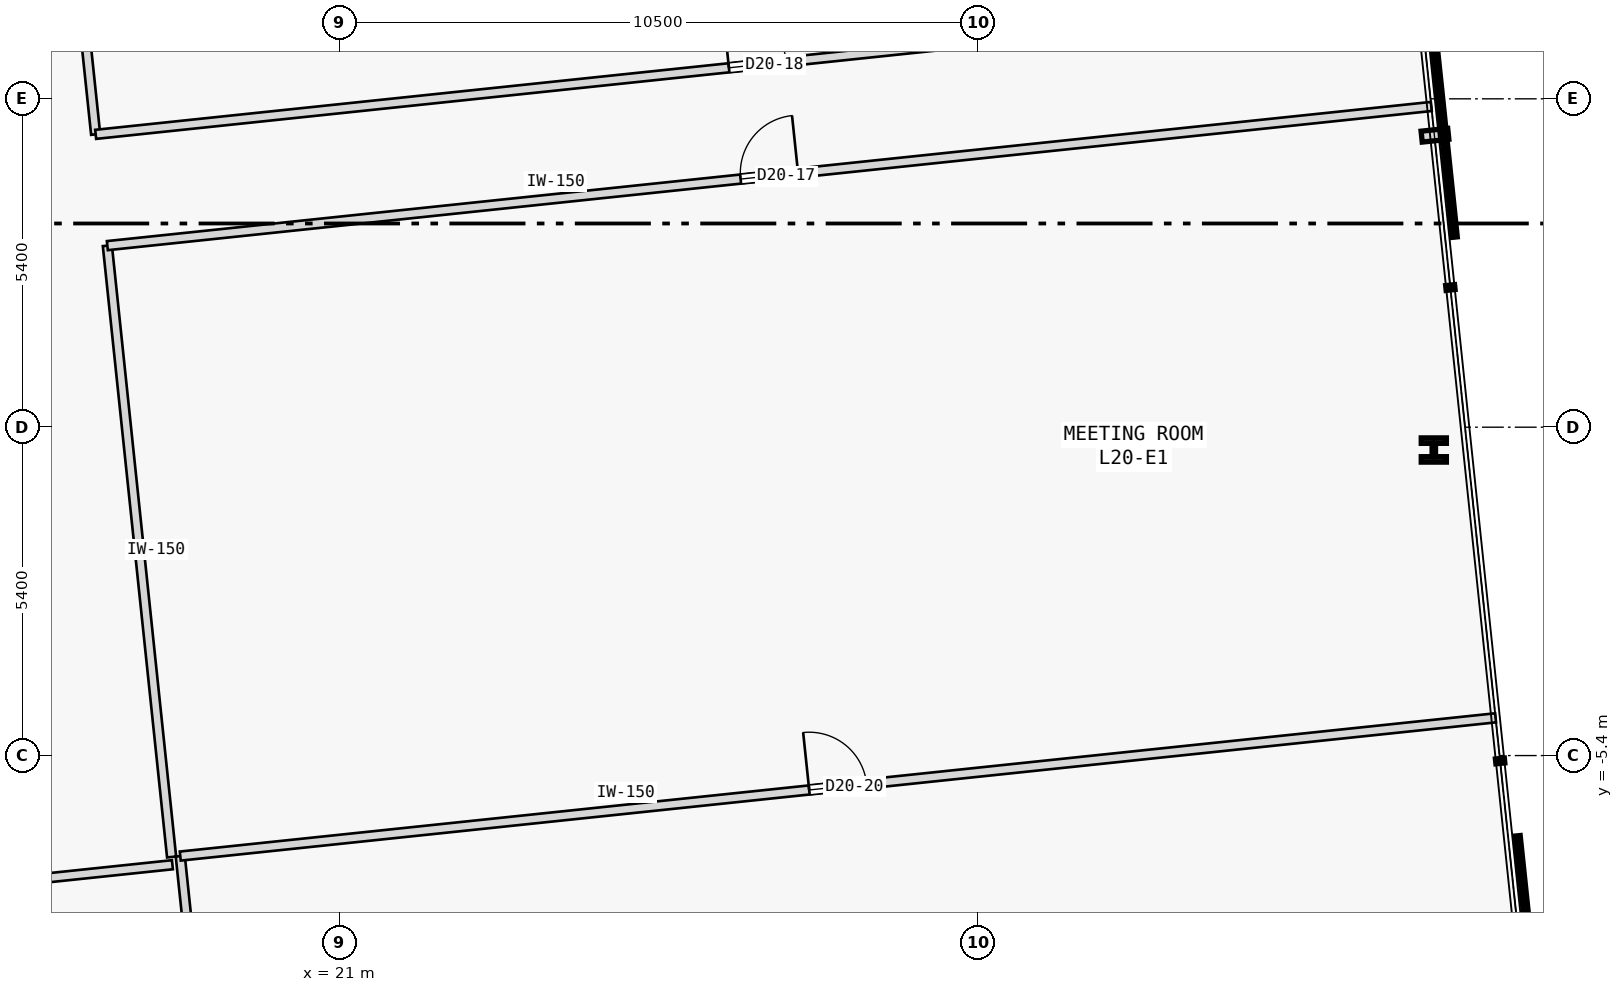
"""IFC4 building model, lengths in metres.
Left out: names, types, materials, properties, quantities, classifications, styles, units other than length and angle.
Written with IfcOpenShell. Run it as: python <this file> out.ifc"""

import sys

from ifc_helpers import new_model, si_unit, direction, frame, frame_2d, origin, origin_2d, place, context, subcontext, project, spatial, rectangle, i_section, extrude, element, fill, save


model = new_model("IFC4")
c1 = context("Model", 3, precision=1e-05, world=origin(), true_north=direction((0.0, 1.0)))
c2 = subcontext(c1, "Body", "Model", "MODEL_VIEW")
j1 = project(units=[si_unit("LENGTHUNIT", "METRE"), si_unit("PLANEANGLEUNIT", "RADIAN")], contexts=[c1])
p1 = place(None, origin())
s1 = spatial("IfcSite", under=j1, at=p1, CompositionType="ELEMENT")
p2 = place(p1, origin())
s2 = spatial("IfcBuilding", under=s1, at=p2, CompositionType="ELEMENT")
p3 = place(p2, frame((0.0, 0.0, 83.2)))
s3 = spatial("IfcBuildingStorey", under=s2, at=p3, CompositionType="ELEMENT", Elevation=83.2)
p4 = place(p3, frame((38.988, -0.375, 0.0), z_axis=(0.0, 0.0, 1.0), x_axis=(1.0, 0.0, 0.0)))
e1 = element("IfcColumn", 1, at=p4, inside=s3, PredefinedType="COLUMN", context=c2, shape_type="SweptSolid", body=[
    extrude(i_section(OverallWidth=0.413, OverallDepth=0.398, WebThickness=0.056, FlangeThickness=0.089, FilletRadius=0.015, at=origin_2d()), origin(), (0.0, 0.0, 1.0), 4.2),
])
p5 = place(p3, frame((4.881, -8.6, 0.0), z_axis=(0.0, 0.0, 1.0), x_axis=(0.994523954947, 0.104508865829, 0.0)))
e2 = element("IfcWall", 2, at=p5, inside=s3, PredefinedType="PARTITIONING", context=c2, shape_type="SweptSolid", body=[
    extrude(rectangle(XDim=13.437, YDim=0.15, at=frame_2d((6.719, 0.0))), origin(), (0.0, 0.0, 1.0), 3.975),
])
p6 = place(p5, frame((8.259, 0.0, 0.0)))
e3 = element("IfcOpeningElement", 3, at=p6, cuts=e2, PredefinedType="OPENING", context=c2, shape_type="SweptSolid", body=[
    extrude(rectangle(XDim=0.95, YDim=2.15, at=frame_2d((0.475, 1.075))), frame((0.0, 0.085, 0.0), z_axis=(0.0, -1.0, 0.0), x_axis=(1.0, 0.0, 0.0)), (0.0, 0.0, 1.0), 0.17),
])
p7 = place(p3, frame((18.231, -7.068, 0.0), z_axis=(0.0, 0.0, 1.0), x_axis=(-0.104523867261, 0.994522378417, 0.0)))
e4 = element("IfcWall", 4, at=p7, inside=s3, PredefinedType="PARTITIONING", context=c2, shape_type="SweptSolid", body=[
    extrude(rectangle(XDim=10.109, YDim=0.15, at=frame_2d((5.055, 0.0))), origin(), (0.0, 0.0, 1.0), 3.975),
])
p8 = place(p3, frame((17.175, 2.986, 0.0), z_axis=(0.0, 0.0, 1.0), x_axis=(0.994522365919, 0.104523986183, 0.0)))
e5 = element("IfcWall", 5, at=p8, inside=s3, PredefinedType="PARTITIONING", context=c2, shape_type="SweptSolid", body=[
    extrude(rectangle(XDim=21.893, YDim=0.15, at=frame_2d((10.946, 0.0))), origin(), (0.0, 0.0, 1.0), 3.975),
])
p9 = place(p8, frame((10.471, 0.0, 0.0)))
e6 = element("IfcOpeningElement", 6, at=p9, cuts=e5, PredefinedType="OPENING", context=c2, shape_type="SweptSolid", body=[
    extrude(rectangle(XDim=0.95, YDim=2.15, at=frame_2d((0.475, 1.075))), frame((0.0, 0.085, 0.0), z_axis=(0.0, -1.0, 0.0), x_axis=(1.0, 0.0, 0.0)), (0.0, 0.0, 1.0), 0.17),
])
p10 = place(p3, frame((16.982, 4.816, 0.0), z_axis=(0.0, 0.0, 1.0), x_axis=(-0.104528094162, 0.994521934163, 0.0)))
e7 = element("IfcWall", 7, at=p10, inside=s3, PredefinedType="PARTITIONING", context=c2, shape_type="SweptSolid", body=[
    extrude(rectangle(XDim=5.921, YDim=0.15, at=frame_2d((2.96, 0.0))), origin(), (0.0, 0.0, 1.0), 3.975),
])
p11 = place(p3, frame((16.982, 4.816, 0.0), z_axis=(0.0, 0.0, 1.0), x_axis=(0.994522487751, 0.10452282697, 0.0)))
e8 = element("IfcWall", 8, at=p11, inside=s3, PredefinedType="PARTITIONING", context=c2, shape_type="SweptSolid", body=[
    extrude(rectangle(XDim=21.893, YDim=0.15, at=frame_2d((10.947, 0.0))), origin(), (0.0, 0.0, 1.0), 3.525),
])
p12 = place(p11, frame((10.471, 0.0, 0.0)))
e9 = element("IfcOpeningElement", 9, at=p12, cuts=e8, PredefinedType="OPENING", context=c2, shape_type="SweptSolid", body=[
    extrude(rectangle(XDim=0.95, YDim=2.15, at=frame_2d((0.475, 1.075))), frame((0.0, 0.085, 0.0), z_axis=(0.0, -1.0, 0.0), x_axis=(1.0, 0.0, 0.0)), (0.0, 0.0, 1.0), 0.17),
])
p13 = place(p3, frame((19.651, -19.207, 0.0), z_axis=(0.0, 0.0, 1.0), x_axis=(-0.104540236679, 0.994520657862, 0.0)))
e10 = element("IfcWall", 10, at=p13, inside=s3, PredefinedType="PARTITIONING", context=c2, shape_type="SweptSolid", body=[
    extrude(rectangle(XDim=12.221, YDim=0.15, at=frame_2d((6.11, 0.0))), origin(), (0.0, 0.0, 1.0), 3.975),
])
p14 = place(p3, frame((18.373, -7.053, 0.0), z_axis=(0.0, 0.0, 1.0), x_axis=(0.994521125611, 0.104535786761, 0.0)))
e11 = element("IfcWall", 11, at=p14, inside=s3, PredefinedType="PARTITIONING", context=c2, shape_type="SweptSolid", body=[
    extrude(rectangle(XDim=21.75, YDim=0.15, at=frame_2d((10.875, 0.0))), origin(), (0.0, 0.0, 1.0), 3.975),
])
p15 = place(p14, frame((10.4, 0.0, 0.0)))
e12 = element("IfcOpeningElement", 12, at=p15, cuts=e11, PredefinedType="OPENING", context=c2, shape_type="SweptSolid", body=[
    extrude(rectangle(XDim=0.95, YDim=2.15, at=frame_2d((0.475, 1.075))), frame((0.0, 0.085, 0.0), z_axis=(0.0, -1.0, 0.0), x_axis=(1.0, 0.0, 0.0)), (0.0, 0.0, 1.0), 0.17),
])
p16 = place(p9, origin())
e13 = element("IfcDoor", 13, at=p16, inside=s3, OperationType="SINGLE_SWING_RIGHT", PredefinedType="DOOR", context=c2, shape_type="SweptSolid", body=[
    extrude(rectangle(XDim=0.95, YDim=2.15, at=frame_2d((0.475, 1.075))), frame((0.0, 0.025, 0.0), z_axis=(0.0, -1.0, 0.0), x_axis=(1.0, 0.0, 0.0)), (0.0, 0.0, 1.0), 0.05),
])
fill(e6, e13)
p17 = place(p12, origin())
e14 = element("IfcDoor", 14, at=p17, inside=s3, OperationType="SINGLE_SWING_LEFT", PredefinedType="DOOR", context=c2, shape_type="SweptSolid", body=[
    extrude(rectangle(XDim=0.95, YDim=2.15, at=frame_2d((0.475, 1.075))), frame((0.0, 0.025, 0.0), z_axis=(0.0, -1.0, 0.0), x_axis=(1.0, 0.0, 0.0)), (0.0, 0.0, 1.0), 0.05),
])
fill(e9, e14)
p18 = place(p15, origin())
e15 = element("IfcDoor", 15, at=p18, inside=s3, OperationType="SINGLE_SWING_LEFT", PredefinedType="DOOR", context=c2, shape_type="SweptSolid", body=[
    extrude(rectangle(XDim=0.95, YDim=2.15, at=frame_2d((0.475, 1.075))), frame((0.0, 0.025, 0.0), z_axis=(0.0, -1.0, 0.0), x_axis=(1.0, 0.0, 0.0)), (0.0, 0.0, 1.0), 0.05),
])
fill(e12, e15)
save(model, sys.argv[1])
